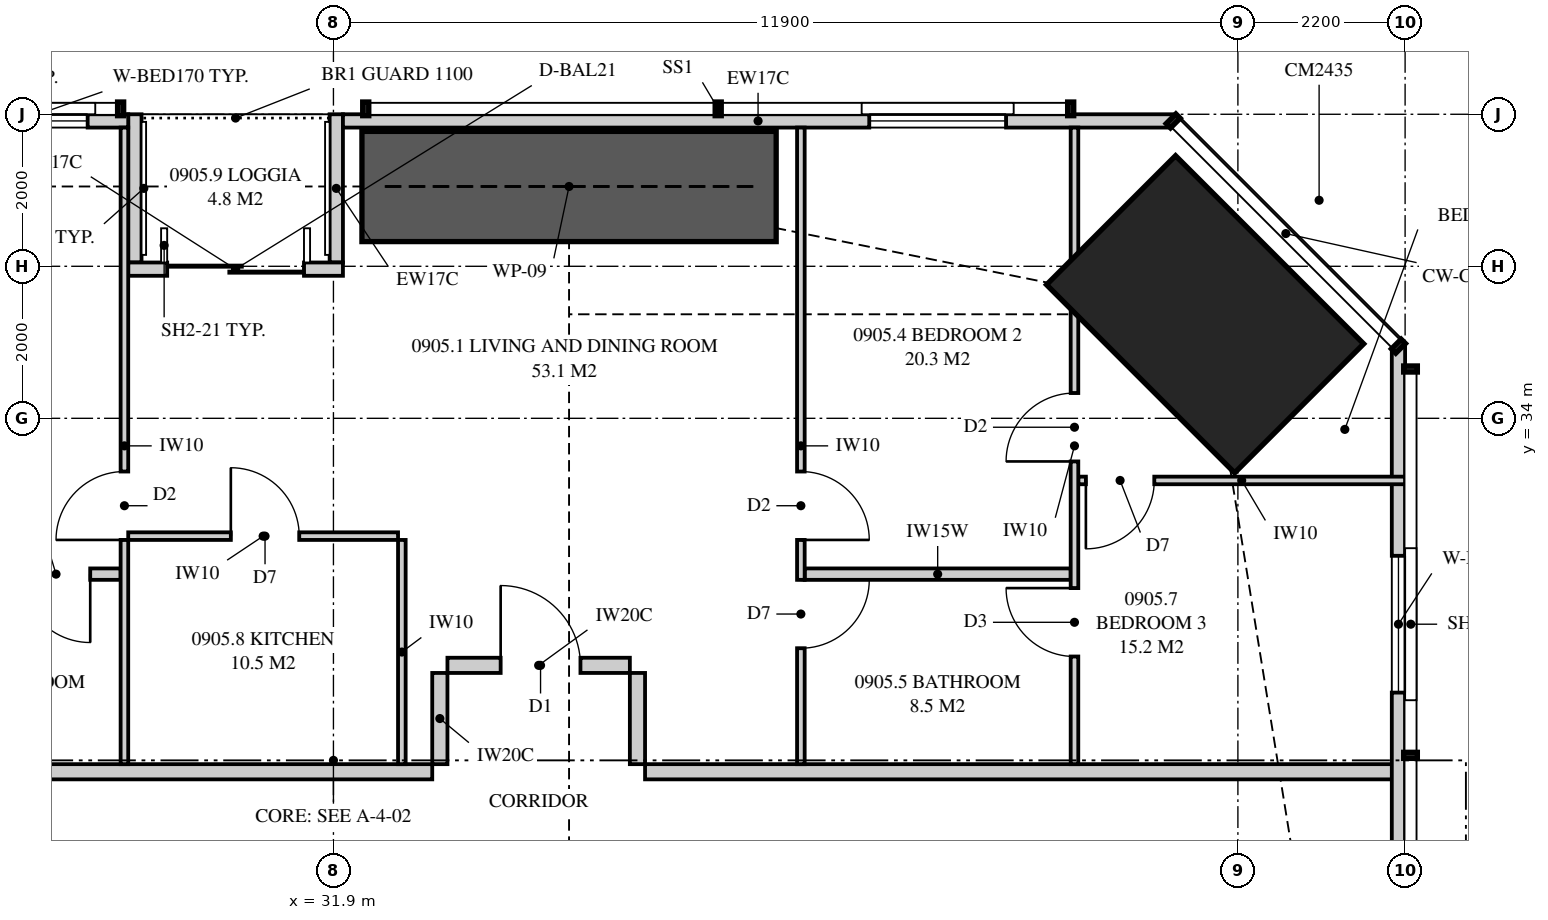
"""IFC4 building model, lengths in metres.
Left out: names, types, materials, properties, quantities, classifications, styles, units other than length and angle.
Written with IfcOpenShell. Run it as: python <this file> out.ifc"""

import sys

from ifc_helpers import new_model, si_unit, direction, frame, frame_2d, origin, origin_2d, place, context, subcontext, project, spatial, polyline, rectangle, outline, extrude, element, fill, save


model = new_model("IFC4")
c1 = context("Model", 3, precision=1e-05, world=origin(), true_north=direction((0.0, 1.0)))
c2 = subcontext(c1, "Body", "Model", "MODEL_VIEW")
j1 = project(units=[si_unit("LENGTHUNIT", "METRE"), si_unit("PLANEANGLEUNIT", "RADIAN")], contexts=[c1])
p1 = place(None, origin())
s1 = spatial("IfcSite", under=j1, at=p1, CompositionType="ELEMENT")
p2 = place(p1, origin())
s2 = spatial("IfcBuilding", under=s1, at=p2, CompositionType="ELEMENT")
p3 = place(p2, frame((0.0, 0.0, 37.75)))
s3 = spatial("IfcBuildingStorey", under=s2, at=p3, CompositionType="ELEMENT", Elevation=37.75)
p4 = place(p3, frame((43.369, 35.369, 0.0), z_axis=(0.0, 0.0, 1.0), x_axis=(-0.707106781187, -0.707106781187, 0.0)))
e1 = element("IfcColumn", 1, at=p4, inside=s3, PredefinedType="COLUMN", context=c2, shape_type="SweptSolid", body=[
    extrude(rectangle(XDim=2.4, YDim=3.5, at=origin_2d()), origin(), (0.0, 0.0, 1.0), 3.35),
])
p5 = place(p3, frame((45.913, 3.051, 0.0), z_axis=(0.0, 0.0, 1.0), x_axis=(0.0, 1.0, 0.0)))
e2 = element("IfcWall", 2, at=p5, inside=s3, PredefinedType="SOLIDWALL", context=c2, shape_type="SweptSolid", body=[
    extrude(outline(polyline([(0.0, 0.0), (31.897, 0.0), (31.897, 3.11), (22.167, 3.11), (22.167, 2.15), (22.074, 2.15), (22.074, 3.11), (21.949, 3.11), (21.949, 2.15), (9.949, 2.15), (9.949, 3.11), (9.823, 3.11), (9.823, 2.15), (9.73, 2.15), (9.73, 3.11), (0.0, 3.11), (0.0, 0.0)])), frame((0.0, 0.087, 0.0), z_axis=(0.0, -1.0, 0.0), x_axis=(1.0, 0.0, 0.0)), (0.0, 0.0, 1.0), 0.175),
])
p6 = place(p5, frame((2.257, 0.0, 0.4)))
e3 = element("IfcOpeningElement", 3, at=p6, cuts=e2, PredefinedType="OPENING", context=c2, shape_type="SweptSolid", body=[
    extrude(rectangle(XDim=1.8, YDim=1.7, at=frame_2d((0.9, 0.85))), frame((0.0, 0.097, 0.0), z_axis=(0.0, -1.0, 0.0), x_axis=(1.0, 0.0, 0.0)), (0.0, 0.0, 1.0), 0.195),
])
p7 = place(p5, frame((14.849, 0.0, 0.4)))
e4 = element("IfcOpeningElement", 4, at=p7, cuts=e2, PredefinedType="OPENING", context=c2, shape_type="SweptSolid", body=[
    extrude(rectangle(XDim=1.2, YDim=1.7, at=frame_2d((0.6, 0.85))), frame((0.0, 0.097, 0.0), z_axis=(0.0, -1.0, 0.0), x_axis=(1.0, 0.0, 0.0)), (0.0, 0.0, 1.0), 0.195),
])
p8 = place(p5, frame((27.34, 0.0, 0.4)))
e5 = element("IfcOpeningElement", 5, at=p8, cuts=e2, PredefinedType="OPENING", context=c2, shape_type="SweptSolid", body=[
    extrude(rectangle(XDim=1.8, YDim=1.7, at=frame_2d((0.9, 0.85))), frame((0.0, 0.097, 0.0), z_axis=(0.0, -1.0, 0.0), x_axis=(1.0, 0.0, 0.0)), (0.0, 0.0, 1.0), 0.195),
])
p9 = place(p3, frame((42.949, 37.913, 0.0), z_axis=(0.0, 0.0, 1.0), x_axis=(-1.0, 0.0, 0.0)))
e6 = element("IfcWall", 6, at=p9, inside=s3, PredefinedType="SOLIDWALL", context=c2, shape_type="SweptSolid", body=[
    extrude(outline(polyline([(0.0, 0.0), (10.924, 0.0), (10.924, 2.15), (7.949, 2.15), (7.949, 3.11), (7.793, 3.11), (7.793, 2.15), (7.745, 2.15), (7.745, 3.11), (0.0, 3.11), (0.0, 0.0)])), frame((0.0, 0.087, 0.0), z_axis=(0.0, -1.0, 0.0), x_axis=(1.0, 0.0, 0.0)), (0.0, 0.0, 1.0), 0.175),
])
p10 = place(p9, frame((2.199, 0.0, 0.4)))
e7 = element("IfcOpeningElement", 7, at=p10, cuts=e6, PredefinedType="OPENING", context=c2, shape_type="SweptSolid", body=[
    extrude(rectangle(XDim=1.8, YDim=1.7, at=frame_2d((0.9, 0.85))), frame((0.0, 0.097, 0.0), z_axis=(0.0, -1.0, 0.0), x_axis=(1.0, 0.0, 0.0)), (0.0, 0.0, 1.0), 0.195),
])
p11 = place(p3, frame((29.2, 37.913, 0.0), z_axis=(0.0, 0.0, 1.0), x_axis=(-1.0, 0.0, 0.0)))
e8 = element("IfcWall", 8, at=p11, inside=s3, PredefinedType="SOLIDWALL", context=c2, shape_type="SweptSolid", body=[
    extrude(rectangle(XDim=8.0, YDim=0.175, at=frame_2d((4.0, 0.0))), origin(), (0.0, 0.0, 1.0), 2.15),
])
p12 = place(p11, frame((0.534, 0.0, 0.4)))
e9 = element("IfcOpeningElement", 9, at=p12, cuts=e8, PredefinedType="OPENING", context=c2, shape_type="SweptSolid", body=[
    extrude(rectangle(XDim=1.8, YDim=1.7, at=frame_2d((0.9, 0.85))), frame((0.0, 0.097, 0.0), z_axis=(0.0, -1.0, 0.0), x_axis=(1.0, 0.0, 0.0)), (0.0, 0.0, 1.0), 0.195),
])
p13 = place(p3, frame((32.025, 35.962, 0.0), z_axis=(0.0, 0.0, 1.0), x_axis=(-1.0, 0.0, 0.0)))
e10 = element("IfcWall", 10, at=p13, inside=s3, PredefinedType="SOLIDWALL", context=c2, shape_type="SweptSolid", body=[
    extrude(rectangle(XDim=2.825, YDim=0.175, at=frame_2d((1.413, 0.0))), origin(), (0.0, 0.0, 1.0), 3.11),
])
p14 = place(p13, frame((0.512, 0.0, 0.0)))
e11 = element("IfcOpeningElement", 11, at=p14, cuts=e10, PredefinedType="OPENING", context=c2, shape_type="SweptSolid", body=[
    extrude(rectangle(XDim=1.8, YDim=2.1, at=frame_2d((0.9, 1.05))), frame((0.0, 0.097, 0.0), z_axis=(0.0, -1.0, 0.0), x_axis=(1.0, 0.0, 0.0)), (0.0, 0.0, 1.0), 0.195),
])
for number, where, z_axis, x_axis in (
    (12, (31.938, 38.0, 0.0), (0.0, 0.0, 1.0), (0.0, -1.0, 0.0)),
    (13, (29.288, 38.0, 0.0), (0.0, 0.0, 1.0), (0.0, -1.0, 0.0)),
):
    element("IfcWall", number, at=place(p3, frame(where, z_axis=z_axis, x_axis=x_axis)), inside=s3, PredefinedType="SOLIDWALL", context=c2, shape_type="SweptSolid", body=[
        extrude(outline(polyline([(0.0, 0.0), (1.95, 0.0), (1.95, 3.11), (1.75, 3.11), (1.75, 2.15), (0.15, 2.15), (0.15, 3.11), (0.0, 3.11), (0.0, 0.0)])), frame((0.0, 0.087, 0.0), z_axis=(0.0, -1.0, 0.0), x_axis=(1.0, 0.0, 0.0)), (0.0, 0.0, 1.0), 0.175),
    ])
p15 = place(p3, frame((23.3, 29.35, 0.0), z_axis=(0.0, 0.0, 1.0), x_axis=(1.0, 0.0, 0.0)))
e14 = element("IfcWall", 14, at=p15, inside=s3, PredefinedType="PARTITIONING", context=c2, shape_type="SweptSolid", body=[
    extrude(outline(polyline([(0.0, 0.0), (9.9, 0.0), (9.9, 3.11), (1.037, 3.11), (1.037, 2.541), (0.363, 2.541), (0.363, 3.11), (0.0, 3.11), (0.0, 0.0)])), frame((0.0, 0.1, 0.0), z_axis=(0.0, -1.0, 0.0), x_axis=(1.0, 0.0, 0.0)), (0.0, 0.0, 1.0), 0.2),
])
p16 = place(p3, frame((29.15, 37.825, 0.0), z_axis=(0.0, 0.0, 1.0), x_axis=(0.0, -1.0, 0.0)))
e15 = element("IfcWall", 15, at=p16, inside=s3, PredefinedType="PARTITIONING", context=c2, shape_type="SweptSolid", body=[
    extrude(outline(polyline([(0.0, 0.0), (8.375, 0.0), (8.375, 3.11), (1.635, 3.11), (1.635, 2.15), (0.0, 2.15), (0.0, 3.11), (0.0, 0.0)])), frame((0.0, 0.05, 0.0), z_axis=(0.0, -1.0, 0.0), x_axis=(1.0, 0.0, 0.0)), (0.0, 0.0, 1.0), 0.1),
])
p17 = place(p16, frame((4.525, 0.0, 0.0)))
e16 = element("IfcOpeningElement", 16, at=p17, cuts=e15, PredefinedType="OPENING", context=c2, shape_type="SweptSolid", body=[
    extrude(rectangle(XDim=0.9, YDim=2.1, at=frame_2d((0.45, 1.05))), frame((0.0, 0.06, 0.0), z_axis=(0.0, -1.0, 0.0), x_axis=(1.0, 0.0, 0.0)), (0.0, 0.0, 1.0), 0.12),
])
p18 = place(p3, frame((38.05, 37.825, 0.0), z_axis=(0.0, 0.0, 1.0), x_axis=(0.0, -1.0, 0.0)))
e17 = element("IfcWall", 17, at=p18, inside=s3, PredefinedType="PARTITIONING", context=c2, shape_type="SweptSolid", body=[
    extrude(outline(polyline([(0.0, 0.0), (8.375, 0.0), (8.375, 3.11), (3.716, 3.11), (3.716, 2.51), (2.265, 2.51), (2.265, 2.15), (0.51, 2.15), (0.51, 3.11), (0.0, 3.11), (0.0, 0.0)])), frame((0.0, 0.05, 0.0), z_axis=(0.0, -1.0, 0.0), x_axis=(1.0, 0.0, 0.0)), (0.0, 0.0, 1.0), 0.1),
])
p19 = place(p18, frame((4.525, 0.0, 0.0)))
e18 = element("IfcOpeningElement", 18, at=p19, cuts=e17, PredefinedType="OPENING", context=c2, shape_type="SweptSolid", body=[
    extrude(rectangle(XDim=0.9, YDim=2.1, at=frame_2d((0.45, 1.05))), frame((0.0, 0.06, 0.0), z_axis=(0.0, -1.0, 0.0), x_axis=(1.0, 0.0, 0.0)), (0.0, 0.0, 1.0), 0.12),
])
p20 = place(p18, frame((5.95, 0.0, 0.0)))
e19 = element("IfcOpeningElement", 19, at=p20, cuts=e17, PredefinedType="OPENING", context=c2, shape_type="SweptSolid", body=[
    extrude(rectangle(XDim=0.9, YDim=2.1, at=frame_2d((0.45, 1.05))), frame((0.0, 0.06, 0.0), z_axis=(0.0, -1.0, 0.0), x_axis=(1.0, 0.0, 0.0)), (0.0, 0.0, 1.0), 0.12),
])
p21 = place(p3, frame((41.65, 37.825, 0.0), z_axis=(0.0, 0.0, 1.0), x_axis=(0.0, -1.0, 0.0)))
e20 = element("IfcWall", 20, at=p21, inside=s3, PredefinedType="PARTITIONING", context=c2, shape_type="SweptSolid", body=[
    extrude(outline(polyline([(0.0, 0.0), (8.375, 0.0), (8.375, 3.11), (3.716, 3.11), (3.716, 2.51), (2.937, 2.51), (2.937, 2.15), (1.285, 2.15), (1.285, 2.51), (1.196, 2.51), (1.196, 3.11), (0.0, 3.11), (0.0, 0.0)])), frame((0.0, 0.05, 0.0), z_axis=(0.0, -1.0, 0.0), x_axis=(1.0, 0.0, 0.0)), (0.0, 0.0, 1.0), 0.1),
])
p22 = place(p21, frame((3.492, 0.0, 0.0)))
e21 = element("IfcOpeningElement", 21, at=p22, cuts=e20, PredefinedType="OPENING", context=c2, shape_type="SweptSolid", body=[
    extrude(rectangle(XDim=0.9, YDim=2.1, at=frame_2d((0.45, 1.05))), frame((0.0, 0.06, 0.0), z_axis=(0.0, -1.0, 0.0), x_axis=(1.0, 0.0, 0.0)), (0.0, 0.0, 1.0), 0.12),
])
p23 = place(p21, frame((6.059, 0.0, 0.0)))
e22 = element("IfcOpeningElement", 22, at=p23, cuts=e20, PredefinedType="OPENING", context=c2, shape_type="SweptSolid", body=[
    extrude(rectangle(XDim=0.9, YDim=2.1, at=frame_2d((0.45, 1.05))), frame((0.0, 0.06, 0.0), z_axis=(0.0, -1.0, 0.0), x_axis=(1.0, 0.0, 0.0)), (0.0, 0.0, 1.0), 0.12),
])
p24 = place(p3, frame((23.3, 31.95, 0.0), z_axis=(0.0, 0.0, 1.0), x_axis=(1.0, 0.0, 0.0)))
e23 = element("IfcWall", 23, at=p24, inside=s3, PredefinedType="PLUMBINGWALL", context=c2, shape_type="SweptSolid", body=[
    extrude(outline(polyline([(0.0, 0.0), (5.8, 0.0), (5.8, 3.11), (1.012, 3.11), (1.012, 2.541), (0.388, 2.541), (0.388, 3.11), (0.0, 3.11), (0.0, 0.0)])), frame((0.0, 0.075, 0.0), z_axis=(0.0, -1.0, 0.0), x_axis=(1.0, 0.0, 0.0)), (0.0, 0.0, 1.0), 0.15),
])
p25 = place(p24, frame((4.5, 0.0, 0.0)))
e24 = element("IfcOpeningElement", 24, at=p25, cuts=e23, PredefinedType="OPENING", context=c2, shape_type="SweptSolid", body=[
    extrude(rectangle(XDim=0.9, YDim=2.1, at=frame_2d((0.45, 1.05))), frame((0.0, 0.085, 0.0), z_axis=(0.0, -1.0, 0.0), x_axis=(1.0, 0.0, 0.0)), (0.0, 0.0, 1.0), 0.17),
])
p26 = place(p3, frame((38.1, 31.95, 0.0), z_axis=(0.0, 0.0, 1.0), x_axis=(1.0, 0.0, 0.0)))
e25 = element("IfcWall", 25, at=p26, inside=s3, PredefinedType="PLUMBINGWALL", context=c2, shape_type="SweptSolid", body=[
    extrude(rectangle(XDim=3.5, YDim=0.15, at=frame_2d((1.75, 0.0))), origin(), (0.0, 0.0, 1.0), 3.11),
])
p27 = place(p3, frame((41.7, 33.183, 0.0), z_axis=(0.0, 0.0, 1.0), x_axis=(1.0, 0.0, 0.0)))
e26 = element("IfcWall", 26, at=p27, inside=s3, PredefinedType="PARTITIONING", context=c2, shape_type="SweptSolid", body=[
    extrude(outline(polyline([(0.0, 0.0), (4.3, 0.0), (4.3, 3.11), (2.894, 3.11), (2.894, 2.15), (1.152, 2.15), (1.152, 3.11), (0.0, 3.11), (0.0, 0.0)])), frame((0.0, 0.05, 0.0), z_axis=(0.0, -1.0, 0.0), x_axis=(1.0, 0.0, 0.0)), (0.0, 0.0, 1.0), 0.1),
])
p28 = place(p27, frame((0.1, 0.0, 0.0)))
e27 = element("IfcOpeningElement", 27, at=p28, cuts=e26, PredefinedType="OPENING", context=c2, shape_type="SweptSolid", body=[
    extrude(rectangle(XDim=0.9, YDim=2.1, at=frame_2d((0.45, 1.05))), frame((0.0, 0.06, 0.0), z_axis=(0.0, -1.0, 0.0), x_axis=(1.0, 0.0, 0.0)), (0.0, 0.0, 1.0), 0.12),
])
p29 = place(p3, frame((29.2, 32.45, 0.0), z_axis=(0.0, 0.0, 1.0), x_axis=(1.0, 0.0, 0.0)))
e28 = element("IfcWall", 28, at=p29, inside=s3, PredefinedType="PARTITIONING", context=c2, shape_type="SweptSolid", body=[
    extrude(rectangle(XDim=3.55, YDim=0.1, at=frame_2d((1.775, 0.0))), origin(), (0.0, 0.0, 1.0), 3.11),
])
p30 = place(p29, frame((1.35, 0.0, 0.0)))
e29 = element("IfcOpeningElement", 29, at=p30, cuts=e28, PredefinedType="OPENING", context=c2, shape_type="SweptSolid", body=[
    extrude(rectangle(XDim=0.9, YDim=2.1, at=frame_2d((0.45, 1.05))), frame((0.0, 0.06, 0.0), z_axis=(0.0, -1.0, 0.0), x_axis=(1.0, 0.0, 0.0)), (0.0, 0.0, 1.0), 0.12),
])
p31 = place(p3, frame((32.8, 32.4, 0.0), z_axis=(0.0, 0.0, 1.0), x_axis=(0.0, -1.0, 0.0)))
e30 = element("IfcWall", 30, at=p31, inside=s3, PredefinedType="PARTITIONING", context=c2, shape_type="SweptSolid", body=[
    extrude(rectangle(XDim=2.95, YDim=0.1, at=frame_2d((1.475, 0.0))), origin(), (0.0, 0.0, 1.0), 3.11),
])
p32 = place(p3, frame((36.0, 29.35, 0.0), z_axis=(0.0, 0.0, 1.0), x_axis=(1.0, 0.0, 0.0)))
e31 = element("IfcWall", 31, at=p32, inside=s3, PredefinedType="PARTITIONING", context=c2, shape_type="SweptSolid", body=[
    extrude(outline(polyline([(0.0, 0.0), (10.0, 0.0), (10.0, 3.11), (9.267, 3.11), (9.267, 2.15), (7.423, 2.15), (7.423, 3.11), (0.0, 3.11), (0.0, 0.0)])), frame((0.0, 0.1, 0.0), z_axis=(0.0, -1.0, 0.0), x_axis=(1.0, 0.0, 0.0)), (0.0, 0.0, 1.0), 0.2),
])
p33 = place(p3, frame((33.4, 30.75, 0.0), z_axis=(0.0, 0.0, 1.0), x_axis=(1.0, 0.0, 0.0)))
e32 = element("IfcWall", 32, at=p33, inside=s3, PredefinedType="PARTITIONING", context=c2, shape_type="SweptSolid", body=[
    extrude(outline(polyline([(0.0, 0.0), (2.4, 0.0), (2.4, 3.11), (1.938, 3.11), (1.938, 2.541), (1.263, 2.541), (1.263, 3.11), (0.0, 3.11), (0.0, 0.0)])), frame((0.0, 0.1, 0.0), z_axis=(0.0, -1.0, 0.0), x_axis=(1.0, 0.0, 0.0)), (0.0, 0.0, 1.0), 0.2),
])
p34 = place(p33, frame((0.7, 0.0, 0.0)))
e33 = element("IfcOpeningElement", 33, at=p34, cuts=e32, PredefinedType="OPENING", context=c2, shape_type="SweptSolid", body=[
    extrude(rectangle(XDim=1.05, YDim=2.2, at=frame_2d((0.525, 1.1))), frame((0.0, 0.11, 0.0), z_axis=(0.0, -1.0, 0.0), x_axis=(1.0, 0.0, 0.0)), (0.0, 0.0, 1.0), 0.22),
])
for number, where, z_axis, x_axis in (
    (34, (33.3, 29.45, 0.0), (0.0, 0.0, 1.0), (0.0, 1.0, 0.0)),
    (35, (35.9, 29.45, 0.0), (0.0, 0.0, 1.0), (0.0, 1.0, 0.0)),
):
    element("IfcWall", number, at=place(p3, frame(where, z_axis=z_axis, x_axis=x_axis)), inside=s3, PredefinedType="PARTITIONING", context=c2, shape_type="SweptSolid", body=[
        extrude(rectangle(XDim=1.2, YDim=0.2, at=frame_2d((0.6, 0.0))), origin(), (0.0, 0.0, 1.0), 3.11),
    ])
p35 = place(p3, frame((32.275, 37.05, 0.0), z_axis=(0.0, 0.0, 1.0), x_axis=(1.0, 0.0, 0.0)))
e36 = element("IfcWall", 36, at=p35, inside=s3, PredefinedType="SHEAR", context=c2, shape_type="SweptSolid", body=[
    extrude(rectangle(XDim=5.45, YDim=1.45, at=frame_2d((2.725, 0.0))), origin(), (0.0, 0.0, 1.0), 3.35),
])
p36 = place(p8, origin())
e37 = element("IfcWindow", 37, at=p36, inside=s3, PartitioningType="SINGLE_PANEL", PredefinedType="WINDOW", context=c2, shape_type="SweptSolid", body=[
    extrude(rectangle(XDim=1.8, YDim=1.7, at=frame_2d((0.9, 0.85))), frame((0.0, 0.03, 0.0), z_axis=(0.0, -1.0, 0.0), x_axis=(1.0, 0.0, 0.0)), (0.0, 0.0, 1.0), 0.06),
])
fill(e5, e37)
p37 = place(p10, origin())
e38 = element("IfcWindow", 38, at=p37, inside=s3, PartitioningType="SINGLE_PANEL", PredefinedType="WINDOW", context=c2, shape_type="SweptSolid", body=[
    extrude(rectangle(XDim=1.8, YDim=1.7, at=frame_2d((0.9, 0.85))), frame((0.0, 0.03, 0.0), z_axis=(0.0, -1.0, 0.0), x_axis=(1.0, 0.0, 0.0)), (0.0, 0.0, 1.0), 0.06),
])
fill(e7, e38)
p38 = place(p14, origin())
e39 = element("IfcDoor", 39, at=p38, inside=s3, OperationType="SLIDING_TO_LEFT", PredefinedType="DOOR", context=c2, shape_type="SweptSolid", body=[
    extrude(rectangle(XDim=1.8, YDim=2.1, at=frame_2d((0.9, 1.05))), frame((0.0, 0.025, 0.0), z_axis=(0.0, -1.0, 0.0), x_axis=(1.0, 0.0, 0.0)), (0.0, 0.0, 1.0), 0.05),
])
fill(e11, e39)
p39 = place(p12, origin())
e40 = element("IfcWindow", 40, at=p39, inside=s3, PartitioningType="SINGLE_PANEL", PredefinedType="WINDOW", context=c2, shape_type="SweptSolid", body=[
    extrude(rectangle(XDim=1.8, YDim=1.7, at=frame_2d((0.9, 0.85))), frame((0.0, 0.03, 0.0), z_axis=(0.0, -1.0, 0.0), x_axis=(1.0, 0.0, 0.0)), (0.0, 0.0, 1.0), 0.06),
])
fill(e9, e40)
p40 = place(p34, origin())
e41 = element("IfcDoor", 41, at=p40, inside=s3, OperationType="SINGLE_SWING_LEFT", PredefinedType="DOOR", context=c2, shape_type="SweptSolid", body=[
    extrude(rectangle(XDim=1.05, YDim=2.2, at=frame_2d((0.525, 1.1))), frame((0.0, 0.025, 0.0), z_axis=(0.0, -1.0, 0.0), x_axis=(1.0, 0.0, 0.0)), (0.0, 0.0, 1.0), 0.05),
])
fill(e33, e41)
p41 = place(p17, frame((0.9, 0.0, 0.0), z_axis=(0.0, 0.0, 1.0), x_axis=(-1.0, 0.0, 0.0)))
e42 = element("IfcDoor", 42, at=p41, inside=s3, OperationType="SINGLE_SWING_LEFT", PredefinedType="DOOR", context=c2, shape_type="SweptSolid", body=[
    extrude(rectangle(XDim=0.9, YDim=2.1, at=frame_2d((0.45, 1.05))), frame((0.0, 0.025, 0.0), z_axis=(0.0, -1.0, 0.0), x_axis=(1.0, 0.0, 0.0)), (0.0, 0.0, 1.0), 0.05),
])
fill(e16, e42)
p42 = place(p25, frame((0.9, 0.0, 0.0), z_axis=(0.0, 0.0, 1.0), x_axis=(-1.0, 0.0, 0.0)))
e43 = element("IfcDoor", 43, at=p42, inside=s3, OperationType="SINGLE_SWING_LEFT", PredefinedType="DOOR", context=c2, shape_type="SweptSolid", body=[
    extrude(rectangle(XDim=0.9, YDim=2.1, at=frame_2d((0.45, 1.05))), frame((0.0, 0.025, 0.0), z_axis=(0.0, -1.0, 0.0), x_axis=(1.0, 0.0, 0.0)), (0.0, 0.0, 1.0), 0.05),
])
fill(e24, e43)
p43 = place(p19, origin())
e44 = element("IfcDoor", 44, at=p43, inside=s3, OperationType="SINGLE_SWING_RIGHT", PredefinedType="DOOR", context=c2, shape_type="SweptSolid", body=[
    extrude(rectangle(XDim=0.9, YDim=2.1, at=frame_2d((0.45, 1.05))), frame((0.0, 0.025, 0.0), z_axis=(0.0, -1.0, 0.0), x_axis=(1.0, 0.0, 0.0)), (0.0, 0.0, 1.0), 0.05),
])
fill(e18, e44)
p44 = place(p20, origin())
e45 = element("IfcDoor", 45, at=p44, inside=s3, OperationType="SINGLE_SWING_LEFT", PredefinedType="DOOR", context=c2, shape_type="SweptSolid", body=[
    extrude(rectangle(XDim=0.9, YDim=2.1, at=frame_2d((0.45, 1.05))), frame((0.0, 0.025, 0.0), z_axis=(0.0, -1.0, 0.0), x_axis=(1.0, 0.0, 0.0)), (0.0, 0.0, 1.0), 0.05),
])
fill(e19, e45)
p45 = place(p28, frame((0.9, 0.0, 0.0), z_axis=(0.0, 0.0, 1.0), x_axis=(-1.0, 0.0, 0.0)))
e46 = element("IfcDoor", 46, at=p45, inside=s3, OperationType="SINGLE_SWING_RIGHT", PredefinedType="DOOR", context=c2, shape_type="SweptSolid", body=[
    extrude(rectangle(XDim=0.9, YDim=2.1, at=frame_2d((0.45, 1.05))), frame((0.0, 0.025, 0.0), z_axis=(0.0, -1.0, 0.0), x_axis=(1.0, 0.0, 0.0)), (0.0, 0.0, 1.0), 0.05),
])
fill(e27, e46)
p46 = place(p22, frame((0.9, 0.0, 0.0), z_axis=(0.0, 0.0, 1.0), x_axis=(-1.0, 0.0, 0.0)))
e47 = element("IfcDoor", 47, at=p46, inside=s3, OperationType="SINGLE_SWING_LEFT", PredefinedType="DOOR", context=c2, shape_type="SweptSolid", body=[
    extrude(rectangle(XDim=0.9, YDim=2.1, at=frame_2d((0.45, 1.05))), frame((0.0, 0.025, 0.0), z_axis=(0.0, -1.0, 0.0), x_axis=(1.0, 0.0, 0.0)), (0.0, 0.0, 1.0), 0.05),
])
fill(e21, e47)
p47 = place(p23, frame((0.9, 0.0, 0.0), z_axis=(0.0, 0.0, 1.0), x_axis=(-1.0, 0.0, 0.0)))
e48 = element("IfcDoor", 48, at=p47, inside=s3, OperationType="SINGLE_SWING_RIGHT", PredefinedType="DOOR", context=c2, shape_type="SweptSolid", body=[
    extrude(rectangle(XDim=0.9, YDim=2.1, at=frame_2d((0.45, 1.05))), frame((0.0, 0.025, 0.0), z_axis=(0.0, -1.0, 0.0), x_axis=(1.0, 0.0, 0.0)), (0.0, 0.0, 1.0), 0.05),
])
fill(e22, e48)
p48 = place(p30, origin())
e49 = element("IfcDoor", 49, at=p48, inside=s3, OperationType="SINGLE_SWING_LEFT", PredefinedType="DOOR", context=c2, shape_type="SweptSolid", body=[
    extrude(rectangle(XDim=0.9, YDim=2.1, at=frame_2d((0.45, 1.05))), frame((0.0, 0.025, 0.0), z_axis=(0.0, -1.0, 0.0), x_axis=(1.0, 0.0, 0.0)), (0.0, 0.0, 1.0), 0.05),
])
fill(e29, e49)
save(model, sys.argv[1])
